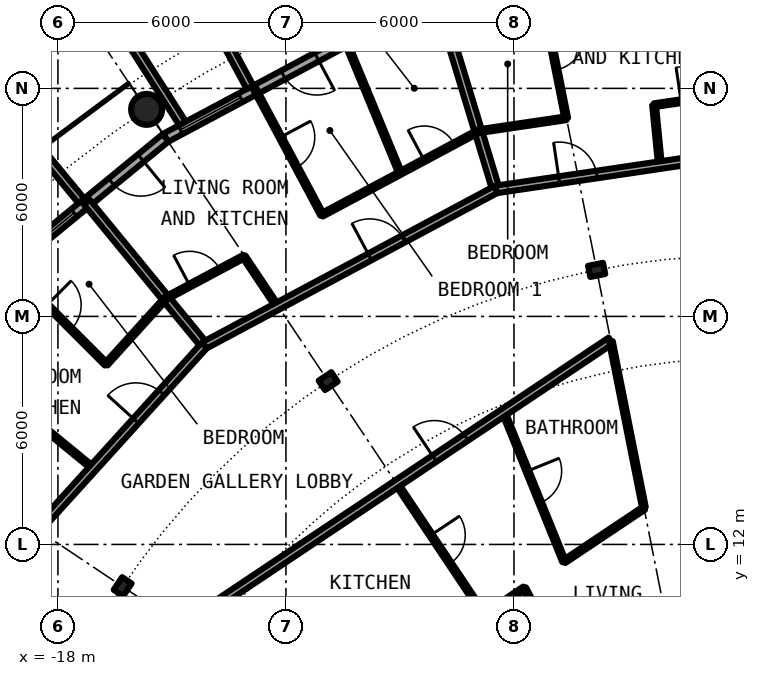
"""IFC4 building model, lengths in metres.
Left out: names, types, materials, properties, quantities, classifications, styles, units other than length and angle.
Written with IfcOpenShell. Run it as: python <this file> out.ifc"""

import sys

from ifc_helpers import new_model, si_unit, direction, frame, frame_2d, origin, origin_2d, place, context, subcontext, project, spatial, rectangle, hollow_circle, i_section, extrude, element, fill, save


model = new_model("IFC4")
c1 = context("Model", 3, precision=1e-05, world=origin(), true_north=direction((0.0, 1.0)))
c2 = subcontext(c1, "Body", "Model", "MODEL_VIEW")
j1 = project(units=[si_unit("LENGTHUNIT", "METRE"), si_unit("PLANEANGLEUNIT", "RADIAN")], contexts=[c1])
p1 = place(None, origin())
s1 = spatial("IfcSite", under=j1, at=p1, CompositionType="ELEMENT")
p2 = place(p1, origin())
s2 = spatial("IfcBuilding", under=s1, at=p2, CompositionType="ELEMENT")
p3 = place(p2, frame((0.0, 0.0, 218.8)))
s3 = spatial("IfcBuildingStorey", under=s2, at=p3, CompositionType="ELEMENT", Elevation=218.8)
p4 = place(p3, frame((-15.667, 23.448, 0.0), z_axis=(0.0, 0.0, 1.0), x_axis=(1.0, 0.0, 0.0)))
e1 = element("IfcColumn", 1, at=p4, inside=s3, PredefinedType="COLUMN", context=c2, shape_type="SweptSolid", body=[
    extrude(hollow_circle(Radius=0.406, WallThickness=0.03, at=origin_2d()), origin(), (0.0, 0.0, 1.0), 3.05),
])
for number, where, z_axis, x_axis in (
    (2, (-3.824, 19.223, 0.0), (0.0, 0.0, 1.0), (-0.195, 0.981, 0.0)),
    (3, (-10.889, 16.297, 0.0), (0.0, 0.0, 1.0), (-0.556, 0.831, 0.0)),
    (4, (-16.297, 10.889, 0.0), (0.0, 0.0, 1.0), (-0.831, 0.556, 0.0)),
):
    element("IfcColumn", number, at=place(p3, frame(where, z_axis=z_axis, x_axis=x_axis)), inside=s3, PredefinedType="COLUMN", context=c2, shape_type="SweptSolid", body=[
        extrude(i_section(OverallWidth=0.3, OverallDepth=0.4, WebThickness=0.013, FlangeThickness=0.024, FilletRadius=0.027, at=origin_2d()), origin(), (0.0, 0.0, 1.0), 3.05),
    ])
p5 = place(p3, frame((-10.447, 25.222, 0.0), z_axis=(0.0, 0.0, 1.0), x_axis=(-0.881915646801, -0.471407246368, 0.0)))
e5 = element("IfcWall", 5, at=p5, inside=s3, PredefinedType="SOLIDWALL", context=c2, shape_type="SweptSolid", body=[
    extrude(rectangle(XDim=5.352, YDim=0.25, at=frame_2d((2.676, 0.0))), origin(), (0.0, 0.0, 1.0), 2.65),
])
p6 = place(p5, frame((0.841, 0.0, 0.0)))
e6 = element("IfcOpeningElement", 6, at=p6, cuts=e5, PredefinedType="OPENING", context=c2, shape_type="SweptSolid", body=[
    extrude(rectangle(XDim=1.0, YDim=2.2, at=frame_2d((0.5, 1.1))), frame((0.0, 0.135, 0.0), z_axis=(0.0, -1.0, 0.0), x_axis=(1.0, 0.0, 0.0)), (0.0, 0.0, 1.0), 0.27),
])
p7 = place(p5, frame((3.111, 0.0, 0.3)))
e7 = element("IfcOpeningElement", 7, at=p7, cuts=e5, PredefinedType="OPENING", context=c2, shape_type="SweptSolid", body=[
    extrude(rectangle(XDim=1.8, YDim=2.1, at=frame_2d((0.9, 1.05))), frame((0.0, 0.135, 0.0), z_axis=(0.0, -1.0, 0.0), x_axis=(1.0, 0.0, 0.0)), (0.0, 0.0, 1.0), 0.27),
])
p8 = place(p3, frame((-12.945, 24.029, -0.03), z_axis=(0.0, 0.0, 1.0), x_axis=(-0.474424310775, 0.88029629861, 0.0)))
e8 = element("IfcWall", 8, at=p8, inside=s3, PredefinedType="SOLIDWALL", context=c2, shape_type="SweptSolid", body=[
    extrude(rectangle(XDim=3.006, YDim=0.2, at=frame_2d((1.503, 0.0))), origin(), (0.0, 0.0, 1.0), 2.68),
])
p9 = place(p3, frame((-14.722, 23.079, -0.03), z_axis=(0.0, 0.0, 1.0), x_axis=(-0.537572179146, 0.843217737129, 0.0)))
e9 = element("IfcWall", 9, at=p9, inside=s3, PredefinedType="SOLIDWALL", context=c2, shape_type="SweptSolid", body=[
    extrude(rectangle(XDim=2.924, YDim=0.2, at=frame_2d((1.462, 0.0))), origin(), (0.0, 0.0, 1.0), 2.68),
])
p10 = place(p3, frame((-15.167, 22.699, 0.0), z_axis=(0.0, 0.0, 1.0), x_axis=(-0.773019449054, -0.634382322723, 0.0)))
e10 = element("IfcWall", 10, at=p10, inside=s3, PredefinedType="SOLIDWALL", context=c2, shape_type="SweptSolid", body=[
    extrude(rectangle(XDim=5.352, YDim=0.25, at=frame_2d((2.676, 0.0))), origin(), (0.0, 0.0, 1.0), 2.65),
])
p11 = place(p10, frame((0.841, 0.0, 0.0)))
e11 = element("IfcOpeningElement", 11, at=p11, cuts=e10, PredefinedType="OPENING", context=c2, shape_type="SweptSolid", body=[
    extrude(rectangle(XDim=1.0, YDim=2.2, at=frame_2d((0.5, 1.1))), frame((0.0, 0.135, 0.0), z_axis=(0.0, -1.0, 0.0), x_axis=(1.0, 0.0, 0.0)), (0.0, 0.0, 1.0), 0.27),
])
p12 = place(p10, frame((3.111, 0.0, 0.3)))
e12 = element("IfcOpeningElement", 12, at=p12, cuts=e10, PredefinedType="OPENING", context=c2, shape_type="SweptSolid", body=[
    extrude(rectangle(XDim=1.8, YDim=2.1, at=frame_2d((0.9, 1.05))), frame((0.0, 0.135, 0.0), z_axis=(0.0, -1.0, 0.0), x_axis=(1.0, 0.0, 0.0)), (0.0, 0.0, 1.0), 0.27),
])
p13 = place(p3, frame((-17.384, 21.041, -0.03), z_axis=(0.0, 0.0, 1.0), x_axis=(-0.63709551667, 0.770784861449, 0.0)))
e13 = element("IfcWall", 13, at=p13, inside=s3, PredefinedType="SOLIDWALL", context=c2, shape_type="SweptSolid", body=[
    extrude(rectangle(XDim=3.006, YDim=0.2, at=frame_2d((1.503, 0.0))), origin(), (0.0, 0.0, 1.0), 2.68),
])
p14 = place(p3, frame((-19.21, 19.222, 0.0), z_axis=(0.0, 0.0, 1.0), x_axis=(0.706967463531, -0.707246071398, 0.0)))
e14 = element("IfcWall", 14, at=p14, inside=s3, PredefinedType="PARTITIONING", context=c2, shape_type="SweptSolid", body=[
    extrude(rectangle(XDim=3.505, YDim=0.1, at=frame_2d((1.752, 0.0))), origin(), (0.0, 0.0, 1.0), 2.65),
])
p15 = place(p14, frame((1.303, 0.0, 0.0)))
e15 = element("IfcOpeningElement", 15, at=p15, cuts=e14, PredefinedType="OPENING", context=c2, shape_type="SweptSolid", body=[
    extrude(rectangle(XDim=0.9, YDim=2.3, at=frame_2d((0.45, 1.15))), frame((0.0, 0.06, 0.0), z_axis=(0.0, -1.0, 0.0), x_axis=(1.0, 0.0, 0.0)), (0.0, 0.0, 1.0), 0.12),
])
p16 = place(p3, frame((-17.24, 21.007, 0.0), z_axis=(0.0, 0.0, 1.0), x_axis=(0.634374159378, -0.773026148273, 0.0)))
e16 = element("IfcWall", 16, at=p16, inside=s3, PredefinedType="PARTITIONING", context=c2, shape_type="SweptSolid", body=[
    extrude(rectangle(XDim=4.876, YDim=0.2, at=frame_2d((2.438, 0.0))), origin(), (0.0, 0.0, 1.0), 2.65),
])
p17 = place(p3, frame((-13.106, 19.574, 0.0), z_axis=(0.0, 0.0, 1.0), x_axis=(0.556271671389, -0.83100049796, 0.0)))
e17 = element("IfcWall", 17, at=p17, inside=s3, PredefinedType="PARTITIONING", context=c2, shape_type="SweptSolid", body=[
    extrude(rectangle(XDim=1.576, YDim=0.1, at=frame_2d((0.788, 0.0))), origin(), (0.0, 0.0, 1.0), 2.65),
])
p18 = place(p3, frame((-12.81, 23.966, 0.0), z_axis=(0.0, 0.0, 1.0), x_axis=(0.471372010014, -0.881934480659, 0.0)))
e18 = element("IfcWall", 18, at=p18, inside=s3, PredefinedType="PARTITIONING", context=c2, shape_type="SweptSolid", body=[
    extrude(rectangle(XDim=3.734, YDim=0.1, at=frame_2d((1.867, 0.0))), origin(), (0.0, 0.0, 1.0), 2.65),
])
p19 = place(p18, frame((1.417, 0.0, 0.0)))
e19 = element("IfcOpeningElement", 19, at=p19, cuts=e18, PredefinedType="OPENING", context=c2, shape_type="SweptSolid", body=[
    extrude(rectangle(XDim=0.9, YDim=2.3, at=frame_2d((0.45, 1.15))), frame((0.0, 0.06, 0.0), z_axis=(0.0, -1.0, 0.0), x_axis=(1.0, 0.0, 0.0)), (0.0, 0.0, 1.0), 0.12),
])
p20 = place(p3, frame((-10.375, 25.116, 0.0), z_axis=(0.0, 0.0, 1.0), x_axis=(0.381733837918, -0.924272295911, 0.0)))
e20 = element("IfcWall", 20, at=p20, inside=s3, PredefinedType="PARTITIONING", context=c2, shape_type="SweptSolid", body=[
    extrude(rectangle(XDim=3.618, YDim=0.1, at=frame_2d((1.809, 0.0))), origin(), (0.0, 0.0, 1.0), 2.65),
])
p21 = place(p3, frame((-9.085, 13.597, 0.0), z_axis=(0.0, 0.0, 1.0), x_axis=(0.555528237031, -0.831497671591, 0.0)))
e21 = element("IfcWall", 21, at=p21, inside=s3, PredefinedType="PARTITIONING", context=c2, shape_type="SweptSolid", body=[
    extrude(rectangle(XDim=4.149, YDim=0.1, at=frame_2d((2.075, 0.0))), origin(), (0.0, 0.0, 1.0), 2.65),
])
p22 = place(p21, frame((1.625, 0.0, 0.0)))
e22 = element("IfcOpeningElement", 22, at=p22, cuts=e21, PredefinedType="OPENING", context=c2, shape_type="SweptSolid", body=[
    extrude(rectangle(XDim=0.9, YDim=2.3, at=frame_2d((0.45, 1.15))), frame((0.0, 0.06, 0.0), z_axis=(0.0, -1.0, 0.0), x_axis=(1.0, 0.0, 0.0)), (0.0, 0.0, 1.0), 0.12),
])
p23 = place(p3, frame((-7.888, 26.005, 0.0), z_axis=(0.0, 0.0, 1.0), x_axis=(0.290053269332, -0.957010502006, 0.0)))
e23 = element("IfcWall", 23, at=p23, inside=s3, PredefinedType="PARTITIONING", context=c2, shape_type="SweptSolid", body=[
    extrude(rectangle(XDim=4.874, YDim=0.2, at=frame_2d((2.437, 0.0))), origin(), (0.0, 0.0, 1.0), 2.65),
])
p24 = place(p3, frame((-6.272, 15.477, 0.0), z_axis=(0.0, 0.0, 1.0), x_axis=(0.375509828455, -0.926818411952, 0.0)))
e24 = element("IfcWall", 24, at=p24, inside=s3, PredefinedType="PARTITIONING", context=c2, shape_type="SweptSolid", body=[
    extrude(rectangle(XDim=4.237, YDim=0.1, at=frame_2d((2.119, 0.0))), origin(), (0.0, 0.0, 1.0), 2.65),
])
p25 = place(p24, frame((1.669, 0.0, 0.0)))
e25 = element("IfcOpeningElement", 25, at=p25, cuts=e24, PredefinedType="OPENING", context=c2, shape_type="SweptSolid", body=[
    extrude(rectangle(XDim=0.9, YDim=2.3, at=frame_2d((0.45, 1.15))), frame((0.0, 0.06, 0.0), z_axis=(0.0, -1.0, 0.0), x_axis=(1.0, 0.0, 0.0)), (0.0, 0.0, 1.0), 0.12),
])
p26 = place(p3, frame((-5.729, 10.849, 0.0), z_axis=(0.0, 0.0, 1.0), x_axis=(0.466962677975, -0.884277025246, 0.0)))
e26 = element("IfcWall", 26, at=p26, inside=s3, PredefinedType="PARTITIONING", context=c2, shape_type="SweptSolid", body=[
    extrude(rectangle(XDim=4.549, YDim=0.1, at=frame_2d((2.274, 0.0))), origin(), (0.0, 0.0, 1.0), 2.65),
])
p27 = place(p26, frame((1.824, 0.0, 0.0)))
e27 = element("IfcOpeningElement", 27, at=p27, cuts=e26, PredefinedType="OPENING", context=c2, shape_type="SweptSolid", body=[
    extrude(rectangle(XDim=0.9, YDim=2.3, at=frame_2d((0.45, 1.15))), frame((0.0, 0.06, 0.0), z_axis=(0.0, -1.0, 0.0), x_axis=(1.0, 0.0, 0.0)), (0.0, 0.0, 1.0), 0.12),
])
p28 = place(p3, frame((-5.31, 26.651, 0.0), z_axis=(0.0, 0.0, 1.0), x_axis=(0.195486409601, -0.980706410533, 0.0)))
e28 = element("IfcWall", 28, at=p28, inside=s3, PredefinedType="PARTITIONING", context=c2, shape_type="SweptSolid", body=[
    extrude(rectangle(XDim=3.504, YDim=0.1, at=frame_2d((1.752, 0.0))), origin(), (0.0, 0.0, 1.0), 2.65),
])
p29 = place(p28, frame((1.302, 0.0, 0.0)))
e29 = element("IfcOpeningElement", 29, at=p29, cuts=e28, PredefinedType="OPENING", context=c2, shape_type="SweptSolid", body=[
    extrude(rectangle(XDim=0.9, YDim=2.3, at=frame_2d((0.45, 1.15))), frame((0.0, 0.06, 0.0), z_axis=(0.0, -1.0, 0.0), x_axis=(1.0, 0.0, 0.0)), (0.0, 0.0, 1.0), 0.12),
])
p30 = place(p3, frame((-2.313, 23.557, 0.0), z_axis=(0.0, 0.0, 1.0), x_axis=(0.097840737576, -0.995202085041, 0.0)))
e30 = element("IfcWall", 30, at=p30, inside=s3, PredefinedType="PARTITIONING", context=c2, shape_type="SweptSolid", body=[
    extrude(rectangle(XDim=1.584, YDim=0.1, at=frame_2d((0.792, 0.0))), origin(), (0.0, 0.0, 1.0), 2.65),
])
p31 = place(p3, frame((-18.302, 15.01, 0.0), z_axis=(0.0, 0.0, 1.0), x_axis=(0.773476341377, -0.633825172528, 0.0)))
e31 = element("IfcWall", 31, at=p31, inside=s3, PredefinedType="PARTITIONING", context=c2, shape_type="SweptSolid", body=[
    extrude(rectangle(XDim=1.584, YDim=0.1, at=frame_2d((0.792, 0.0))), origin(), (0.0, 0.0, 1.0), 2.65),
])
p32 = place(p3, frame((-8.55, 8.963, 0.0), z_axis=(0.0, 0.0, 1.0), x_axis=(0.83129689803, 0.555828631257, 0.0)))
e32 = element("IfcWall", 32, at=p32, inside=s3, PredefinedType="PARTITIONING", context=c2, shape_type="SweptSolid", body=[
    extrude(rectangle(XDim=3.394, YDim=0.1, at=frame_2d((1.697, 0.0))), origin(), (0.0, 0.0, 1.0), 2.65),
])
p33 = place(p3, frame((-4.678, 11.551, 0.0), z_axis=(0.0, 0.0, 1.0), x_axis=(0.831440395268, 0.555613956912, 0.0)))
e33 = element("IfcWall", 33, at=p33, inside=s3, PredefinedType="PARTITIONING", context=c2, shape_type="SweptSolid", body=[
    extrude(rectangle(XDim=2.527, YDim=0.1, at=frame_2d((1.264, 0.0))), origin(), (0.0, 0.0, 1.0), 2.65),
])
p34 = place(p3, frame((-14.718, 9.832, 0.0), z_axis=(0.0, 0.0, 1.0), x_axis=(0.831437137577, 0.555618831806, 0.0)))
e34 = element("IfcWall", 34, at=p34, inside=s3, PredefinedType="PARTITIONING", context=c2, shape_type="SweptSolid", body=[
    extrude(rectangle(XDim=13.549, YDim=0.2, at=frame_2d((6.774, 0.0))), origin(), (0.0, 0.0, 1.0), 2.65),
])
p35 = place(p34, frame((7.968, 0.0, 0.0)))
e35 = element("IfcOpeningElement", 35, at=p35, cuts=e34, PredefinedType="OPENING", context=c2, shape_type="SweptSolid", body=[
    extrude(rectangle(XDim=1.0, YDim=2.3, at=frame_2d((0.5, 1.15))), frame((0.0, 0.11, 0.0), z_axis=(0.0, -1.0, 0.0), x_axis=(1.0, 0.0, 0.0)), (0.0, 0.0, 1.0), 0.22),
])
p36 = place(p3, frame((-14.147, 17.238, 0.0), z_axis=(0.0, 0.0, 1.0), x_axis=(0.881912965532, 0.471412262491, 0.0)))
e36 = element("IfcWall", 36, at=p36, inside=s3, PredefinedType="PARTITIONING", context=c2, shape_type="SweptSolid", body=[
    extrude(rectangle(XDim=8.702, YDim=0.2, at=frame_2d((4.351, 0.0))), origin(), (0.0, 0.0, 1.0), 2.65),
])
p37 = place(p36, frame((4.937, 0.0, 0.0)))
e37 = element("IfcOpeningElement", 37, at=p37, cuts=e36, PredefinedType="OPENING", context=c2, shape_type="SweptSolid", body=[
    extrude(rectangle(XDim=1.0, YDim=2.3, at=frame_2d((0.5, 1.15))), frame((0.0, 0.11, 0.0), z_axis=(0.0, -1.0, 0.0), x_axis=(1.0, 0.0, 0.0)), (0.0, 0.0, 1.0), 0.22),
])
p38 = place(p3, frame((-18.542, 12.389, 0.0), z_axis=(0.0, 0.0, 1.0), x_axis=(0.671561669125, 0.740948665268, 0.0)))
e38 = element("IfcWall", 38, at=p38, inside=s3, PredefinedType="PARTITIONING", context=c2, shape_type="SweptSolid", body=[
    extrude(rectangle(XDim=6.544, YDim=0.2, at=frame_2d((3.272, 0.0))), origin(), (0.0, 0.0, 1.0), 2.65),
])
p39 = place(p38, frame((3.862, 0.0, 0.0)))
e39 = element("IfcOpeningElement", 39, at=p39, cuts=e38, PredefinedType="OPENING", context=c2, shape_type="SweptSolid", body=[
    extrude(rectangle(XDim=1.0, YDim=2.3, at=frame_2d((0.5, 1.15))), frame((0.0, 0.11, 0.0), z_axis=(0.0, -1.0, 0.0), x_axis=(1.0, 0.0, 0.0)), (0.0, 0.0, 1.0), 0.22),
])
p40 = place(p3, frame((-6.473, 21.34, 0.0), z_axis=(0.0, 0.0, 1.0), x_axis=(0.989181015112, 0.146700100005, 0.0)))
e40 = element("IfcWall", 40, at=p40, inside=s3, PredefinedType="PARTITIONING", context=c2, shape_type="SweptSolid", body=[
    extrude(rectangle(XDim=6.544, YDim=0.2, at=frame_2d((3.272, 0.0))), origin(), (0.0, 0.0, 1.0), 2.65),
])
p41 = place(p40, frame((1.681, 0.0, 0.0)))
e41 = element("IfcOpeningElement", 41, at=p41, cuts=e40, PredefinedType="OPENING", context=c2, shape_type="SweptSolid", body=[
    extrude(rectangle(XDim=1.0, YDim=2.3, at=frame_2d((0.5, 1.15))), frame((0.0, 0.11, 0.0), z_axis=(0.0, -1.0, 0.0), x_axis=(1.0, 0.0, 0.0)), (0.0, 0.0, 1.0), 0.22),
])
p42 = place(p3, frame((-15.162, 18.475, 0.0), z_axis=(0.0, 0.0, 1.0), x_axis=(0.881949682246, 0.471343566824, 0.0)))
e42 = element("IfcWall", 42, at=p42, inside=s3, PredefinedType="PARTITIONING", context=c2, shape_type="SweptSolid", body=[
    extrude(rectangle(XDim=2.331, YDim=0.1, at=frame_2d((1.166, 0.0))), origin(), (0.0, 0.0, 1.0), 2.65),
])
p43 = place(p42, frame((0.716, 0.0, 0.0)))
e43 = element("IfcOpeningElement", 43, at=p43, cuts=e42, PredefinedType="OPENING", context=c2, shape_type="SweptSolid", body=[
    extrude(rectangle(XDim=0.9, YDim=2.3, at=frame_2d((0.45, 1.15))), frame((0.0, 0.06, 0.0), z_axis=(0.0, -1.0, 0.0), x_axis=(1.0, 0.0, 0.0)), (0.0, 0.0, 1.0), 0.12),
])
p44 = place(p3, frame((-11.05, 20.673, 0.0), z_axis=(0.0, 0.0, 1.0), x_axis=(0.881916280728, 0.471406060405, 0.0)))
e44 = element("IfcWall", 44, at=p44, inside=s3, PredefinedType="PARTITIONING", context=c2, shape_type="SweptSolid", body=[
    extrude(rectangle(XDim=4.663, YDim=0.1, at=frame_2d((2.331, 0.0))), origin(), (0.0, 0.0, 1.0), 2.65),
])
p45 = place(p44, frame((3.047, 0.0, 0.0)))
e45 = element("IfcOpeningElement", 45, at=p45, cuts=e44, PredefinedType="OPENING", context=c2, shape_type="SweptSolid", body=[
    extrude(rectangle(XDim=0.9, YDim=2.3, at=frame_2d((0.45, 1.15))), frame((0.0, 0.06, 0.0), z_axis=(0.0, -1.0, 0.0), x_axis=(1.0, 0.0, 0.0)), (0.0, 0.0, 1.0), 0.12),
])
p46 = place(p3, frame((-16.732, 16.743, 0.0), z_axis=(0.0, 0.0, 1.0), x_axis=(0.671528384412, 0.740978831634, 0.0)))
e46 = element("IfcWall", 46, at=p46, inside=s3, PredefinedType="PARTITIONING", context=c2, shape_type="SweptSolid", body=[
    extrude(rectangle(XDim=2.338, YDim=0.1, at=frame_2d((1.169, 0.0))), origin(), (0.0, 0.0, 1.0), 2.65),
])
p47 = place(p3, frame((-6.938, 22.871, 0.0), z_axis=(0.0, 0.0, 1.0), x_axis=(0.989181588285, 0.146696235121, 0.0)))
e47 = element("IfcWall", 47, at=p47, inside=s3, PredefinedType="PARTITIONING", context=c2, shape_type="SweptSolid", body=[
    extrude(rectangle(XDim=2.338, YDim=0.1, at=frame_2d((1.169, 0.0))), origin(), (0.0, 0.0, 1.0), 2.65),
])
p48 = place(p3, frame((-2.313, 23.557, 0.0), z_axis=(0.0, 0.0, 1.0), x_axis=(0.989181588285, 0.146696235121, 0.0)))
e48 = element("IfcWall", 48, at=p48, inside=s3, PredefinedType="PARTITIONING", context=c2, shape_type="SweptSolid", body=[
    extrude(rectangle(XDim=2.338, YDim=0.1, at=frame_2d((1.169, 0.0))), origin(), (0.0, 0.0, 1.0), 2.65),
])
p49 = place(p48, frame((0.719, 0.0, 0.0)))
e49 = element("IfcOpeningElement", 49, at=p49, cuts=e48, PredefinedType="OPENING", context=c2, shape_type="SweptSolid", body=[
    extrude(rectangle(XDim=0.9, YDim=2.3, at=frame_2d((0.45, 1.15))), frame((0.0, 0.06, 0.0), z_axis=(0.0, -1.0, 0.0), x_axis=(1.0, 0.0, 0.0)), (0.0, 0.0, 1.0), 0.12),
])
p50 = place(p3, frame((-3.449, 17.339, 0.0), z_axis=(0.0, 0.0, 1.0), x_axis=(0.195102838171, -0.980782790702, 0.0)))
e50 = element("IfcWall", 50, at=p50, inside=s3, PredefinedType="PARTITIONING", context=c2, shape_type="SweptSolid", body=[
    extrude(rectangle(XDim=4.448, YDim=0.1, at=frame_2d((2.224, 0.0))), origin(), (0.0, 0.0, 1.0), 2.65),
])
p51 = place(p6, origin())
e51 = element("IfcDoor", 51, at=p51, inside=s3, OperationType="SINGLE_SWING_LEFT", PredefinedType="DOOR", context=c2, shape_type="SweptSolid", body=[
    extrude(rectangle(XDim=1.0, YDim=2.2, at=frame_2d((0.5, 1.1))), frame((0.0, 0.025, 0.0), z_axis=(0.0, -1.0, 0.0), x_axis=(1.0, 0.0, 0.0)), (0.0, 0.0, 1.0), 0.05),
])
fill(e6, e51)
p52 = place(p7, origin())
e52 = element("IfcWindow", 52, at=p52, inside=s3, PartitioningType="SINGLE_PANEL", PredefinedType="WINDOW", context=c2, shape_type="SweptSolid", body=[
    extrude(rectangle(XDim=1.8, YDim=2.1, at=frame_2d((0.9, 1.05))), frame((0.0, 0.03, 0.0), z_axis=(0.0, -1.0, 0.0), x_axis=(1.0, 0.0, 0.0)), (0.0, 0.0, 1.0), 0.06),
])
fill(e7, e52)
p53 = place(p11, origin())
e53 = element("IfcDoor", 53, at=p53, inside=s3, OperationType="SINGLE_SWING_LEFT", PredefinedType="DOOR", context=c2, shape_type="SweptSolid", body=[
    extrude(rectangle(XDim=1.0, YDim=2.2, at=frame_2d((0.5, 1.1))), frame((0.0, 0.025, 0.0), z_axis=(0.0, -1.0, 0.0), x_axis=(1.0, 0.0, 0.0)), (0.0, 0.0, 1.0), 0.05),
])
fill(e11, e53)
p54 = place(p12, origin())
e54 = element("IfcWindow", 54, at=p54, inside=s3, PartitioningType="SINGLE_PANEL", PredefinedType="WINDOW", context=c2, shape_type="SweptSolid", body=[
    extrude(rectangle(XDim=1.8, YDim=2.1, at=frame_2d((0.9, 1.05))), frame((0.0, 0.03, 0.0), z_axis=(0.0, -1.0, 0.0), x_axis=(1.0, 0.0, 0.0)), (0.0, 0.0, 1.0), 0.06),
])
fill(e12, e54)
p55 = place(p41, origin())
e55 = element("IfcDoor", 55, at=p55, inside=s3, OperationType="SINGLE_SWING_LEFT", PredefinedType="DOOR", context=c2, shape_type="SweptSolid", body=[
    extrude(rectangle(XDim=1.0, YDim=2.3, at=frame_2d((0.5, 1.15))), frame((0.0, 0.025, 0.0), z_axis=(0.0, -1.0, 0.0), x_axis=(1.0, 0.0, 0.0)), (0.0, 0.0, 1.0), 0.05),
])
fill(e41, e55)
p56 = place(p29, origin())
e56 = element("IfcDoor", 56, at=p56, inside=s3, OperationType="SINGLE_SWING_RIGHT", PredefinedType="DOOR", context=c2, shape_type="SweptSolid", body=[
    extrude(rectangle(XDim=0.9, YDim=2.3, at=frame_2d((0.45, 1.15))), frame((0.0, 0.025, 0.0), z_axis=(0.0, -1.0, 0.0), x_axis=(1.0, 0.0, 0.0)), (0.0, 0.0, 1.0), 0.05),
])
fill(e29, e56)
p57 = place(p37, origin())
e57 = element("IfcDoor", 57, at=p57, inside=s3, OperationType="SINGLE_SWING_RIGHT", PredefinedType="DOOR", context=c2, shape_type="SweptSolid", body=[
    extrude(rectangle(XDim=1.0, YDim=2.3, at=frame_2d((0.5, 1.15))), frame((0.0, 0.025, 0.0), z_axis=(0.0, -1.0, 0.0), x_axis=(1.0, 0.0, 0.0)), (0.0, 0.0, 1.0), 0.05),
])
fill(e37, e57)
p58 = place(p43, origin())
e58 = element("IfcDoor", 58, at=p58, inside=s3, OperationType="SINGLE_SWING_LEFT", PredefinedType="DOOR", context=c2, shape_type="SweptSolid", body=[
    extrude(rectangle(XDim=0.9, YDim=2.3, at=frame_2d((0.45, 1.15))), frame((0.0, 0.025, 0.0), z_axis=(0.0, -1.0, 0.0), x_axis=(1.0, 0.0, 0.0)), (0.0, 0.0, 1.0), 0.05),
])
fill(e43, e58)
p59 = place(p19, origin())
e59 = element("IfcDoor", 59, at=p59, inside=s3, OperationType="SINGLE_SWING_RIGHT", PredefinedType="DOOR", context=c2, shape_type="SweptSolid", body=[
    extrude(rectangle(XDim=0.9, YDim=2.3, at=frame_2d((0.45, 1.15))), frame((0.0, 0.025, 0.0), z_axis=(0.0, -1.0, 0.0), x_axis=(1.0, 0.0, 0.0)), (0.0, 0.0, 1.0), 0.05),
])
fill(e19, e59)
p60 = place(p45, origin())
e60 = element("IfcDoor", 60, at=p60, inside=s3, OperationType="SINGLE_SWING_RIGHT", PredefinedType="DOOR", context=c2, shape_type="SweptSolid", body=[
    extrude(rectangle(XDim=0.9, YDim=2.3, at=frame_2d((0.45, 1.15))), frame((0.0, 0.025, 0.0), z_axis=(0.0, -1.0, 0.0), x_axis=(1.0, 0.0, 0.0)), (0.0, 0.0, 1.0), 0.05),
])
fill(e45, e60)
p61 = place(p39, origin())
e61 = element("IfcDoor", 61, at=p61, inside=s3, OperationType="SINGLE_SWING_RIGHT", PredefinedType="DOOR", context=c2, shape_type="SweptSolid", body=[
    extrude(rectangle(XDim=1.0, YDim=2.3, at=frame_2d((0.5, 1.15))), frame((0.0, 0.025, 0.0), z_axis=(0.0, -1.0, 0.0), x_axis=(1.0, 0.0, 0.0)), (0.0, 0.0, 1.0), 0.05),
])
fill(e39, e61)
p62 = place(p15, origin())
e62 = element("IfcDoor", 62, at=p62, inside=s3, OperationType="SINGLE_SWING_LEFT", PredefinedType="DOOR", context=c2, shape_type="SweptSolid", body=[
    extrude(rectangle(XDim=0.9, YDim=2.3, at=frame_2d((0.45, 1.15))), frame((0.0, 0.025, 0.0), z_axis=(0.0, -1.0, 0.0), x_axis=(1.0, 0.0, 0.0)), (0.0, 0.0, 1.0), 0.05),
])
fill(e15, e62)
p63 = place(p35, origin())
e63 = element("IfcDoor", 63, at=p63, inside=s3, OperationType="SINGLE_SWING_RIGHT", PredefinedType="DOOR", context=c2, shape_type="SweptSolid", body=[
    extrude(rectangle(XDim=1.0, YDim=2.3, at=frame_2d((0.5, 1.15))), frame((0.0, 0.025, 0.0), z_axis=(0.0, -1.0, 0.0), x_axis=(1.0, 0.0, 0.0)), (0.0, 0.0, 1.0), 0.05),
])
fill(e35, e63)
p64 = place(p25, origin())
e64 = element("IfcDoor", 64, at=p64, inside=s3, OperationType="SINGLE_SWING_RIGHT", PredefinedType="DOOR", context=c2, shape_type="SweptSolid", body=[
    extrude(rectangle(XDim=0.9, YDim=2.3, at=frame_2d((0.45, 1.15))), frame((0.0, 0.025, 0.0), z_axis=(0.0, -1.0, 0.0), x_axis=(1.0, 0.0, 0.0)), (0.0, 0.0, 1.0), 0.05),
])
fill(e25, e64)
p65 = place(p22, origin())
e65 = element("IfcDoor", 65, at=p65, inside=s3, OperationType="SINGLE_SWING_LEFT", PredefinedType="DOOR", context=c2, shape_type="SweptSolid", body=[
    extrude(rectangle(XDim=0.9, YDim=2.3, at=frame_2d((0.45, 1.15))), frame((0.0, 0.025, 0.0), z_axis=(0.0, -1.0, 0.0), x_axis=(1.0, 0.0, 0.0)), (0.0, 0.0, 1.0), 0.05),
])
fill(e22, e65)
save(model, sys.argv[1])
